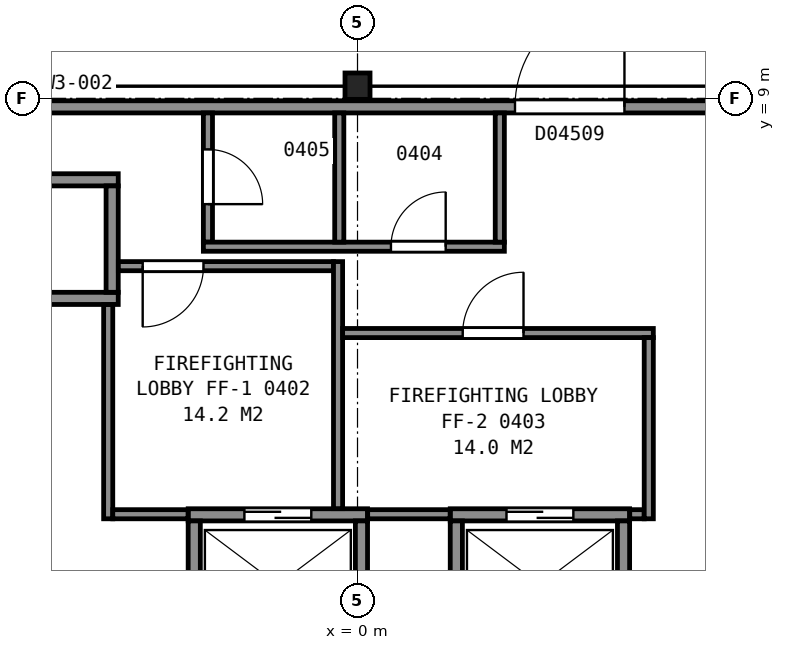
"""IFC4 building model, lengths in metres.
Left out: names, types, materials, properties, quantities, classifications, styles, units other than length and angle.
Written with IfcOpenShell. Run it as: python <this file> out.ifc"""

import sys

from ifc_helpers import new_model, si_unit, direction, frame, frame_2d, origin, origin_2d, place, context, subcontext, project, spatial, rectangle, i_section, extrude, element, fill, save


model = new_model("IFC4")
c1 = context("Model", 3, precision=1e-05, world=origin(), true_north=direction((0.0, 1.0)))
c2 = subcontext(c1, "Body", "Model", "MODEL_VIEW")
j1 = project(units=[si_unit("LENGTHUNIT", "METRE"), si_unit("PLANEANGLEUNIT", "RADIAN")], contexts=[c1])
p1 = place(None, origin())
s1 = spatial("IfcSite", under=j1, at=p1, CompositionType="ELEMENT")
p2 = place(p1, origin())
s2 = spatial("IfcBuilding", under=s1, at=p2, CompositionType="ELEMENT")
p3 = place(p2, frame((0.0, 0.0, 27.2)))
s3 = spatial("IfcBuildingStorey", under=s2, at=p3, CompositionType="ELEMENT", Elevation=27.2)
p4 = place(p3, frame((0.0, 9.2, 0.0), z_axis=(0.0, 0.0, 1.0), x_axis=(1.0, 0.0, 0.0)))
e1 = element("IfcColumn", 1, at=p4, inside=s3, PredefinedType="COLUMN", context=c2, shape_type="SweptSolid", body=[
    extrude(i_section(OverallWidth=0.411, OverallDepth=0.434, WebThickness=0.036, FlangeThickness=0.057, FilletRadius=0.015, at=origin_2d()), origin(), (0.0, 0.0, 1.0), 4.8),
])
p5 = place(p3, frame((-2.785, 2.15, 0.0), z_axis=(0.0, 0.0, 1.0), x_axis=(1.0, 0.0, 0.0)))
e2 = element("IfcWall", 2, at=p5, inside=s3, PredefinedType="PARTITIONING", context=c2, shape_type="SweptSolid", body=[
    extrude(rectangle(XDim=2.95, YDim=0.2, at=frame_2d((1.475, 0.0))), origin(), (0.0, 0.0, 1.0), 4.8),
])
p6 = place(p5, frame((0.925, 0.0, 0.0)))
e3 = element("IfcOpeningElement", 3, at=p6, cuts=e2, PredefinedType="OPENING", context=c2, shape_type="SweptSolid", body=[
    extrude(rectangle(XDim=1.1, YDim=2.1, at=frame_2d((0.55, 1.05))), frame((0.0, 0.11, 0.0), z_axis=(0.0, -1.0, 0.0), x_axis=(1.0, 0.0, 0.0)), (0.0, 0.0, 1.0), 0.22),
])
p7 = place(p3, frame((1.525, 2.15, 0.0), z_axis=(0.0, 0.0, 1.0), x_axis=(1.0, 0.0, 0.0)))
e4 = element("IfcWall", 4, at=p7, inside=s3, PredefinedType="PARTITIONING", context=c2, shape_type="SweptSolid", body=[
    extrude(rectangle(XDim=2.95, YDim=0.2, at=frame_2d((1.475, 0.0))), origin(), (0.0, 0.0, 1.0), 4.8),
])
p8 = place(p7, frame((0.925, 0.0, 0.0)))
e5 = element("IfcOpeningElement", 5, at=p8, cuts=e4, PredefinedType="OPENING", context=c2, shape_type="SweptSolid", body=[
    extrude(rectangle(XDim=1.1, YDim=2.1, at=frame_2d((0.55, 1.05))), frame((0.0, 0.11, 0.0), z_axis=(0.0, -1.0, 0.0), x_axis=(1.0, 0.0, 0.0)), (0.0, 0.0, 1.0), 0.22),
])
for number, where, z_axis, x_axis in (
    (6, (-6.285, 5.71, 0.0), (0.0, 0.0, 1.0), (1.0, 0.0, 0.0)),
    (7, (-6.285, 7.66, 0.0), (0.0, 0.0, 1.0), (1.0, 0.0, 0.0)),
):
    element("IfcWall", number, at=place(p3, frame(where, z_axis=z_axis, x_axis=x_axis)), inside=s3, PredefinedType="PARTITIONING", context=c2, shape_type="SweptSolid", body=[
        extrude(rectangle(XDim=2.35, YDim=0.2, at=frame_2d((1.175, 0.0))), origin(), (0.0, 0.0, 1.0), 4.8),
    ])
p9 = place(p3, frame((5.663, -1.612, 0.0), z_axis=(0.0, 0.0, 1.0), x_axis=(0.49998122708, 0.866036242063, 0.0)))
e8 = element("IfcWall", 8, at=p9, inside=s3, PredefinedType="PARTITIONING", context=c2, shape_type="SweptSolid", body=[
    extrude(rectangle(XDim=4.9, YDim=0.2, at=frame_2d((2.45, 0.0))), origin(), (0.0, 0.0, 1.0), 4.8),
])
for number, where, z_axis, x_axis in (
    (9, (4.375, 0.1, 0.0), (0.0, 0.0, 1.0), (0.0, 1.0, 0.0)),
    (10, (1.625, 0.1, 0.0), (0.0, 0.0, 1.0), (0.0, 1.0, 0.0)),
    (11, (0.065, 0.1, 0.0), (0.0, 0.0, 1.0), (0.0, 1.0, 0.0)),
    (12, (-2.685, 0.1, 0.0), (0.0, 0.0, 1.0), (0.0, 1.0, 0.0)),
):
    element("IfcWall", number, at=place(p3, frame(where, z_axis=z_axis, x_axis=x_axis)), inside=s3, PredefinedType="PARTITIONING", context=c2, shape_type="SweptSolid", body=[
        extrude(rectangle(XDim=1.95, YDim=0.2, at=frame_2d((0.975, 0.0))), origin(), (0.0, 0.0, 1.0), 4.8),
    ])
p10 = place(p3, frame((-4.035, 5.81, 0.0), z_axis=(0.0, 0.0, 1.0), x_axis=(0.0, 1.0, 0.0)))
e13 = element("IfcWall", 13, at=p10, inside=s3, PredefinedType="PARTITIONING", context=c2, shape_type="SweptSolid", body=[
    extrude(rectangle(XDim=1.75, YDim=0.2, at=frame_2d((0.875, 0.0))), origin(), (0.0, 0.0, 1.0), 4.8),
])
p11 = place(p3, frame((11.986, 8.86, 0.0), z_axis=(0.0, 0.0, 1.0), x_axis=(-1.0, 0.0, 0.0)))
e14 = element("IfcWall", 14, at=p11, inside=s3, PredefinedType="PARTITIONING", context=c2, shape_type="SweptSolid", body=[
    extrude(rectangle(XDim=23.967, YDim=0.2, at=frame_2d((11.983, 0.0))), origin(), (0.0, 0.0, 1.0), 4.55),
])
p12 = place(p11, frame((7.596, 0.0, 0.0)))
e15 = element("IfcOpeningElement", 15, at=p12, cuts=e14, PredefinedType="OPENING", context=c2, shape_type="SweptSolid", body=[
    extrude(rectangle(XDim=1.8, YDim=2.1, at=frame_2d((0.9, 1.05))), frame((0.0, 0.11, 0.0), z_axis=(0.0, -1.0, 0.0), x_axis=(1.0, 0.0, 0.0)), (0.0, 0.0, 1.0), 0.22),
])
p13 = place(p3, frame((-4.1, 2.085, 0.0), z_axis=(0.0, 0.0, 1.0), x_axis=(0.0, 1.0, 0.0)))
e16 = element("IfcWall", 16, at=p13, inside=s3, PredefinedType="PARTITIONING", context=c2, shape_type="SweptSolid", body=[
    extrude(rectangle(XDim=3.523, YDim=0.15, at=frame_2d((1.761, 0.0))), origin(), (0.0, 0.0, 1.0), 4.55),
])
p14 = place(p3, frame((-4.025, 2.16, 0.0), z_axis=(0.0, 0.0, 1.0), x_axis=(1.0, 0.0, 0.0)))
e17 = element("IfcWall", 17, at=p14, inside=s3, PredefinedType="PARTITIONING", context=c2, shape_type="SweptSolid", body=[
    extrude(rectangle(XDim=1.238, YDim=0.15, at=frame_2d((0.619, 0.0))), origin(), (0.0, 0.0, 1.0), 4.55),
])
p15 = place(p3, frame((-3.933, 6.24, 0.0), z_axis=(0.0, 0.0, 1.0), x_axis=(1.0, 0.0, 0.0)))
e18 = element("IfcWall", 18, at=p15, inside=s3, PredefinedType="PARTITIONING", context=c2, shape_type="SweptSolid", body=[
    extrude(rectangle(XDim=3.538, YDim=0.15, at=frame_2d((1.769, 0.0))), origin(), (0.0, 0.0, 1.0), 4.55),
])
p16 = place(p15, frame((0.4, 0.0, 0.0)))
e19 = element("IfcOpeningElement", 19, at=p16, cuts=e18, PredefinedType="OPENING", context=c2, shape_type="SweptSolid", body=[
    extrude(rectangle(XDim=1.0, YDim=2.1, at=frame_2d((0.5, 1.05))), frame((0.0, 0.085, 0.0), z_axis=(0.0, -1.0, 0.0), x_axis=(1.0, 0.0, 0.0)), (0.0, 0.0, 1.0), 0.17),
])
p17 = place(p3, frame((-2.46, 8.76, 0.0), z_axis=(0.0, 0.0, 1.0), x_axis=(0.0, -1.0, 0.0)))
e20 = element("IfcWall", 20, at=p17, inside=s3, PredefinedType="PARTITIONING", context=c2, shape_type="SweptSolid", body=[
    extrude(rectangle(XDim=2.125, YDim=0.15, at=frame_2d((1.062, 0.0))), origin(), (0.0, 0.0, 1.0), 4.55),
])
p18 = place(p17, frame((0.6, 0.0, 0.0)))
e21 = element("IfcOpeningElement", 21, at=p18, cuts=e20, PredefinedType="OPENING", context=c2, shape_type="SweptSolid", body=[
    extrude(rectangle(XDim=0.9, YDim=2.1, at=frame_2d((0.45, 1.05))), frame((0.0, 0.085, 0.0), z_axis=(0.0, -1.0, 0.0), x_axis=(1.0, 0.0, 0.0)), (0.0, 0.0, 1.0), 0.17),
])
p19 = place(p3, frame((-2.535, 6.56, 0.0), z_axis=(0.0, 0.0, 1.0), x_axis=(1.0, 0.0, 0.0)))
e22 = element("IfcWall", 22, at=p19, inside=s3, PredefinedType="PARTITIONING", context=c2, shape_type="SweptSolid", body=[
    extrude(rectangle(XDim=4.95, YDim=0.15, at=frame_2d((2.475, 0.0))), origin(), (0.0, 0.0, 1.0), 4.55),
])
p20 = place(p19, frame((3.085, 0.0, 0.0)))
e23 = element("IfcOpeningElement", 23, at=p20, cuts=e22, PredefinedType="OPENING", context=c2, shape_type="SweptSolid", body=[
    extrude(rectangle(XDim=0.9, YDim=2.1, at=frame_2d((0.45, 1.05))), frame((0.0, 0.085, 0.0), z_axis=(0.0, -1.0, 0.0), x_axis=(1.0, 0.0, 0.0)), (0.0, 0.0, 1.0), 0.17),
])
p21 = place(p3, frame((-0.32, 2.252, 0.0), z_axis=(0.0, 0.0, 1.0), x_axis=(0.0, 1.0, 0.0)))
e24 = element("IfcWall", 24, at=p21, inside=s3, PredefinedType="PARTITIONING", context=c2, shape_type="SweptSolid", body=[
    extrude(rectangle(XDim=4.063, YDim=0.15, at=frame_2d((2.031, 0.0))), origin(), (0.0, 0.0, 1.0), 4.55),
])
p22 = place(p3, frame((-0.245, 5.14, 0.0), z_axis=(0.0, 0.0, 1.0), x_axis=(1.0, 0.0, 0.0)))
e25 = element("IfcWall", 25, at=p22, inside=s3, PredefinedType="PARTITIONING", context=c2, shape_type="SweptSolid", body=[
    extrude(rectangle(XDim=5.11, YDim=0.15, at=frame_2d((2.555, 0.0))), origin(), (0.0, 0.0, 1.0), 4.55),
])
p23 = place(p22, frame((1.975, 0.0, 0.0)))
e26 = element("IfcOpeningElement", 26, at=p23, cuts=e25, PredefinedType="OPENING", context=c2, shape_type="SweptSolid", body=[
    extrude(rectangle(XDim=1.0, YDim=2.1, at=frame_2d((0.5, 1.05))), frame((0.0, 0.085, 0.0), z_axis=(0.0, -1.0, 0.0), x_axis=(1.0, 0.0, 0.0)), (0.0, 0.0, 1.0), 0.17),
])
p24 = place(p3, frame((-0.3, 6.635, 0.0), z_axis=(0.0, 0.0, 1.0), x_axis=(0.0, 1.0, 0.0)))
e27 = element("IfcWall", 27, at=p24, inside=s3, PredefinedType="PARTITIONING", context=c2, shape_type="SweptSolid", body=[
    extrude(rectangle(XDim=2.125, YDim=0.15, at=frame_2d((1.062, 0.0))), origin(), (0.0, 0.0, 1.0), 4.55),
])
p25 = place(p3, frame((0.167, 2.16, 0.0), z_axis=(0.0, 0.0, 1.0), x_axis=(1.0, 0.0, 0.0)))
e28 = element("IfcWall", 28, at=p25, inside=s3, PredefinedType="PARTITIONING", context=c2, shape_type="SweptSolid", body=[
    extrude(rectangle(XDim=1.356, YDim=0.15, at=frame_2d((0.678, 0.0))), origin(), (0.0, 0.0, 1.0), 4.55),
])
p26 = place(p3, frame((2.34, 6.635, 0.0), z_axis=(0.0, 0.0, 1.0), x_axis=(0.0, 1.0, 0.0)))
e29 = element("IfcWall", 29, at=p26, inside=s3, PredefinedType="PARTITIONING", context=c2, shape_type="SweptSolid", body=[
    extrude(rectangle(XDim=2.125, YDim=0.15, at=frame_2d((1.062, 0.0))), origin(), (0.0, 0.0, 1.0), 4.55),
])
p27 = place(p3, frame((3.803, -11.133, 0.0), z_axis=(0.0, 0.0, 1.0), x_axis=(0.499995287022, 0.866028124807, 0.0)))
e30 = element("IfcWall", 30, at=p27, inside=s3, PredefinedType="PARTITIONING", context=c2, shape_type="SweptSolid", body=[
    extrude(rectangle(XDim=19.726, YDim=0.2, at=frame_2d((9.863, 0.0))), origin(), (0.0, 0.0, 1.0), 4.55),
])
p28 = place(p27, frame((9.2, 0.0, 0.0)))
e31 = element("IfcOpeningElement", 31, at=p28, cuts=e30, PredefinedType="OPENING", context=c2, shape_type="SweptSolid", body=[
    extrude(rectangle(XDim=1.8, YDim=2.1, at=frame_2d((0.9, 1.05))), frame((0.0, 0.11, 0.0), z_axis=(0.0, -1.0, 0.0), x_axis=(1.0, 0.0, 0.0)), (0.0, 0.0, 1.0), 0.22),
])
p29 = place(p3, frame((4.477, 2.16, 0.0), z_axis=(0.0, 0.0, 1.0), x_axis=(1.0, 0.0, 0.0)))
e32 = element("IfcWall", 32, at=p29, inside=s3, PredefinedType="PARTITIONING", context=c2, shape_type="SweptSolid", body=[
    extrude(rectangle(XDim=0.238, YDim=0.15, at=frame_2d((0.119, 0.0))), origin(), (0.0, 0.0, 1.0), 4.55),
])
p30 = place(p3, frame((4.79, 2.085, 0.0), z_axis=(0.0, 0.0, 1.0), x_axis=(0.0, 1.0, 0.0)))
e33 = element("IfcWall", 33, at=p30, inside=s3, PredefinedType="PARTITIONING", context=c2, shape_type="SweptSolid", body=[
    extrude(rectangle(XDim=2.98, YDim=0.15, at=frame_2d((1.49, 0.0))), origin(), (0.0, 0.0, 1.0), 4.55),
])
p31 = place(p3, frame((-4.438, -20.054, 0.0), z_axis=(0.0, 0.0, 1.0), x_axis=(-0.499994028088, 0.866028851642, 0.0)))
e34 = element("IfcWall", 34, at=p31, inside=s3, PredefinedType="PARTITIONING", context=c2, shape_type="SweptSolid", body=[
    extrude(rectangle(XDim=30.297, YDim=0.125, at=frame_2d((15.148, 0.0))), origin(), (0.0, 0.0, 1.0), 3.653),
])
p32 = place(p31, frame((23.885, 0.0, 0.0)))
e35 = element("IfcOpeningElement", 35, at=p32, cuts=e34, PredefinedType="OPENING", context=c2, shape_type="SweptSolid", body=[
    extrude(rectangle(XDim=1.8, YDim=2.4, at=frame_2d((0.9, 1.2))), frame((0.0, 0.073, 0.0), z_axis=(0.0, -1.0, 0.0), x_axis=(1.0, 0.0, 0.0)), (0.0, 0.0, 1.0), 0.145),
])
p33 = place(p31, frame((12.541, 0.0, 0.0)))
e36 = element("IfcOpeningElement", 36, at=p33, cuts=e34, PredefinedType="OPENING", context=c2, shape_type="SweptSolid", body=[
    extrude(rectangle(XDim=1.0, YDim=2.1, at=frame_2d((0.5, 1.05))), frame((0.0, 0.073, 0.0), z_axis=(0.0, -1.0, 0.0), x_axis=(1.0, 0.0, 0.0)), (0.0, 0.0, 1.0), 0.145),
])
p34 = place(p31, frame((2.916, 0.0, 0.0)))
e37 = element("IfcOpeningElement", 37, at=p34, cuts=e34, PredefinedType="OPENING", context=c2, shape_type="SweptSolid", body=[
    extrude(rectangle(XDim=1.0, YDim=2.1, at=frame_2d((0.5, 1.05))), frame((0.0, 0.073, 0.0), z_axis=(0.0, -1.0, 0.0), x_axis=(1.0, 0.0, 0.0)), (0.0, 0.0, 1.0), 0.145),
])
p35 = place(p3, frame((19.586, 6.184, 0.0), z_axis=(0.0, 0.0, 1.0), x_axis=(-0.499994028088, -0.866028851642, 0.0)))
e38 = element("IfcWall", 38, at=p35, inside=s3, PredefinedType="PARTITIONING", context=c2, shape_type="SweptSolid", body=[
    extrude(rectangle(XDim=30.297, YDim=0.125, at=frame_2d((15.148, 0.0))), origin(), (0.0, 0.0, 1.0), 3.653),
])
p36 = place(p35, frame((25.985, 0.0, 0.0)))
e39 = element("IfcOpeningElement", 39, at=p36, cuts=e38, PredefinedType="OPENING", context=c2, shape_type="SweptSolid", body=[
    extrude(rectangle(XDim=1.8, YDim=2.4, at=frame_2d((0.9, 1.2))), frame((0.0, 0.073, 0.0), z_axis=(0.0, -1.0, 0.0), x_axis=(1.0, 0.0, 0.0)), (0.0, 0.0, 1.0), 0.145),
])
p37 = place(p35, frame((18.832, 0.0, 0.0)))
e40 = element("IfcOpeningElement", 40, at=p37, cuts=e38, PredefinedType="OPENING", context=c2, shape_type="SweptSolid", body=[
    extrude(rectangle(XDim=1.0, YDim=2.1, at=frame_2d((0.5, 1.05))), frame((0.0, 0.073, 0.0), z_axis=(0.0, -1.0, 0.0), x_axis=(1.0, 0.0, 0.0)), (0.0, 0.0, 1.0), 0.145),
])
p38 = place(p35, frame((10.049, 0.0, 0.0)))
e41 = element("IfcOpeningElement", 41, at=p38, cuts=e38, PredefinedType="OPENING", context=c2, shape_type="SweptSolid", body=[
    extrude(rectangle(XDim=1.8, YDim=2.4, at=frame_2d((0.9, 1.2))), frame((0.0, 0.073, 0.0), z_axis=(0.0, -1.0, 0.0), x_axis=(1.0, 0.0, 0.0)), (0.0, 0.0, 1.0), 0.145),
])
p39 = place(p35, frame((2.917, 0.0, 0.0)))
e42 = element("IfcOpeningElement", 42, at=p39, cuts=e38, PredefinedType="OPENING", context=c2, shape_type="SweptSolid", body=[
    extrude(rectangle(XDim=1.0, YDim=2.1, at=frame_2d((0.5, 1.05))), frame((0.0, 0.073, 0.0), z_axis=(0.0, -1.0, 0.0), x_axis=(1.0, 0.0, 0.0)), (0.0, 0.0, 1.0), 0.145),
])
p40 = place(p6, origin())
e43 = element("IfcDoor", 43, at=p40, inside=s3, OperationType="SLIDING_TO_LEFT", PredefinedType="DOOR", context=c2, shape_type="SweptSolid", body=[
    extrude(rectangle(XDim=1.1, YDim=2.1, at=frame_2d((0.55, 1.05))), frame((0.0, 0.025, 0.0), z_axis=(0.0, -1.0, 0.0), x_axis=(1.0, 0.0, 0.0)), (0.0, 0.0, 1.0), 0.05),
])
fill(e3, e43)
p41 = place(p8, origin())
e44 = element("IfcDoor", 44, at=p41, inside=s3, OperationType="SLIDING_TO_RIGHT", PredefinedType="DOOR", context=c2, shape_type="SweptSolid", body=[
    extrude(rectangle(XDim=1.1, YDim=2.1, at=frame_2d((0.55, 1.05))), frame((0.0, 0.025, 0.0), z_axis=(0.0, -1.0, 0.0), x_axis=(1.0, 0.0, 0.0)), (0.0, 0.0, 1.0), 0.05),
])
fill(e5, e44)
p42 = place(p12, origin())
e45 = element("IfcDoor", 45, at=p42, inside=s3, OperationType="DOUBLE_DOOR_SINGLE_SWING", PredefinedType="DOOR", context=c2, shape_type="SweptSolid", body=[
    extrude(rectangle(XDim=1.8, YDim=2.1, at=frame_2d((0.9, 1.05))), frame((0.0, 0.025, 0.0), z_axis=(0.0, -1.0, 0.0), x_axis=(1.0, 0.0, 0.0)), (0.0, 0.0, 1.0), 0.05),
])
fill(e15, e45)
p43 = place(p16, origin())
e46 = element("IfcDoor", 46, at=p43, inside=s3, OperationType="SINGLE_SWING_LEFT", PredefinedType="DOOR", context=c2, shape_type="SweptSolid", body=[
    extrude(rectangle(XDim=1.0, YDim=2.1, at=frame_2d((0.5, 1.05))), frame((0.0, 0.025, 0.0), z_axis=(0.0, -1.0, 0.0), x_axis=(1.0, 0.0, 0.0)), (0.0, 0.0, 1.0), 0.05),
])
fill(e19, e46)
p44 = place(p18, origin())
e47 = element("IfcDoor", 47, at=p44, inside=s3, OperationType="SINGLE_SWING_RIGHT", PredefinedType="DOOR", context=c2, shape_type="SweptSolid", body=[
    extrude(rectangle(XDim=0.9, YDim=2.1, at=frame_2d((0.45, 1.05))), frame((0.0, 0.025, 0.0), z_axis=(0.0, -1.0, 0.0), x_axis=(1.0, 0.0, 0.0)), (0.0, 0.0, 1.0), 0.05),
])
fill(e21, e47)
p45 = place(p20, origin())
e48 = element("IfcDoor", 48, at=p45, inside=s3, OperationType="SINGLE_SWING_RIGHT", PredefinedType="DOOR", context=c2, shape_type="SweptSolid", body=[
    extrude(rectangle(XDim=0.9, YDim=2.1, at=frame_2d((0.45, 1.05))), frame((0.0, 0.025, 0.0), z_axis=(0.0, -1.0, 0.0), x_axis=(1.0, 0.0, 0.0)), (0.0, 0.0, 1.0), 0.05),
])
fill(e23, e48)
p46 = place(p23, origin())
e49 = element("IfcDoor", 49, at=p46, inside=s3, OperationType="SINGLE_SWING_RIGHT", PredefinedType="DOOR", context=c2, shape_type="SweptSolid", body=[
    extrude(rectangle(XDim=1.0, YDim=2.1, at=frame_2d((0.5, 1.05))), frame((0.0, 0.025, 0.0), z_axis=(0.0, -1.0, 0.0), x_axis=(1.0, 0.0, 0.0)), (0.0, 0.0, 1.0), 0.05),
])
fill(e26, e49)
save(model, sys.argv[1])
